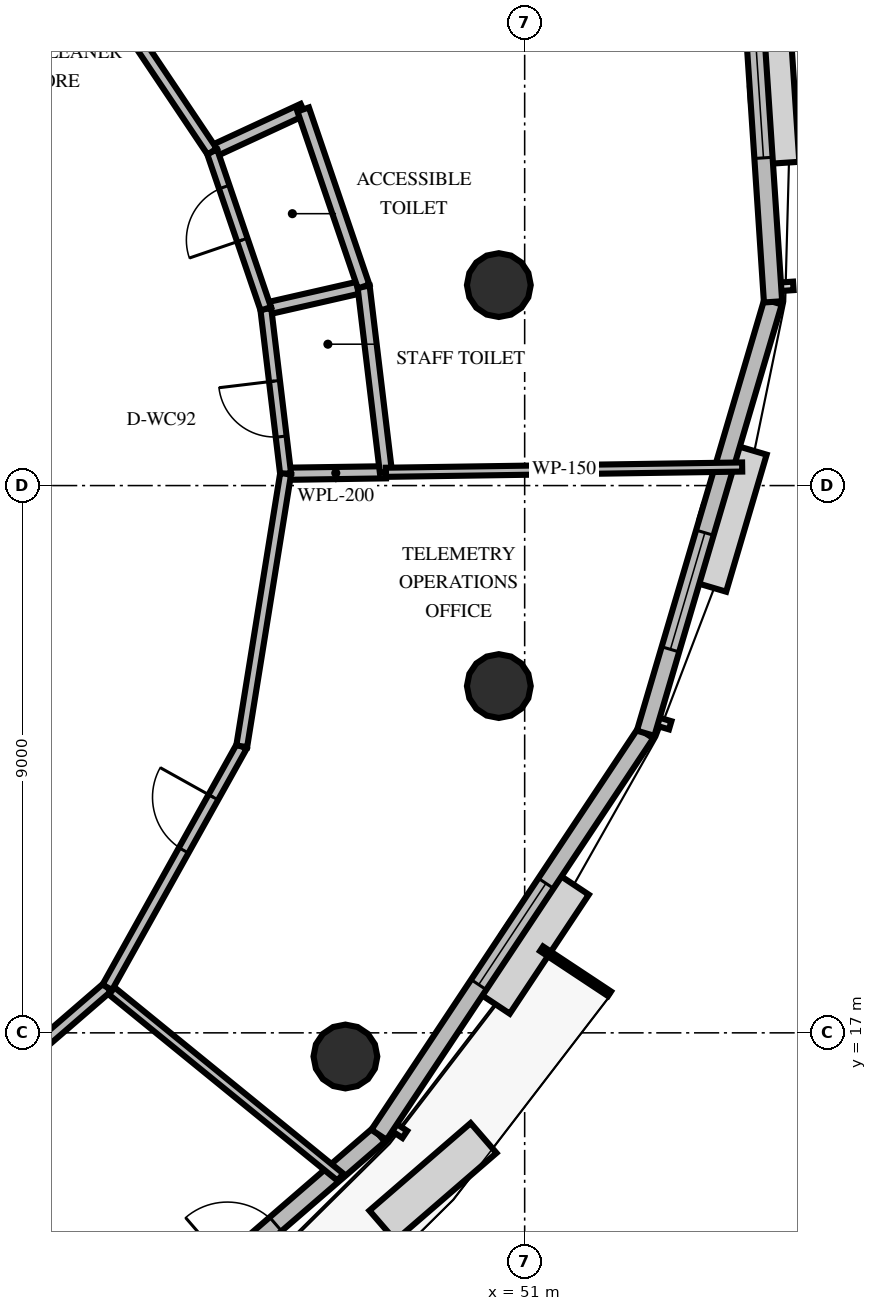
"""IFC4 building model, lengths in metres.
Left out: names, types, materials, properties, quantities, classifications, styles, units other than length and angle.
Written with IfcOpenShell. Run it as: python <this file> out.ifc"""

import sys

from ifc_helpers import new_model, si_unit, direction, frame, frame_2d, origin, origin_2d, place, context, subcontext, project, spatial, rectangle, circle, extrude, element, fill, save


model = new_model("IFC4")
c1 = context("Model", 3, precision=1e-05, world=origin(), true_north=direction((0.0, 1.0)))
c2 = subcontext(c1, "Body", "Model", "MODEL_VIEW")
j1 = project(units=[si_unit("LENGTHUNIT", "METRE"), si_unit("PLANEANGLEUNIT", "RADIAN")], contexts=[c1])
p1 = place(None, origin())
s1 = spatial("IfcSite", under=j1, at=p1, CompositionType="ELEMENT")
p2 = place(p1, origin())
s2 = spatial("IfcBuilding", under=s1, at=p2, CompositionType="ELEMENT")
p3 = place(p2, frame((0.0, 0.0, 202.4)))
s3 = spatial("IfcBuildingStorey", under=s2, at=p3, CompositionType="ELEMENT", Elevation=202.4)
for number, where, z_axis, x_axis in (
    (1, (50.575, 29.297, 0.0), (0.0, 0.0, 1.0), (1.0, 0.0, 0.0)),
    (2, (48.052, 16.611, 0.0), (0.0, 0.0, 1.0), (1.0, 0.0, 0.0)),
    (3, (50.575, 22.703, 0.0), (0.0, 0.0, 1.0), (1.0, 0.0, 0.0)),
):
    element("IfcColumn", number, at=place(p3, frame(where, z_axis=z_axis, x_axis=x_axis)), inside=s3, PredefinedType="COLUMN", context=c2, shape_type="SweptSolid", body=[
        extrude(circle(Radius=0.525, at=origin_2d()), origin(), (0.0, 0.0, 1.0), 3.6),
    ])
p4 = place(p3, frame((42.457, 10.008, 0.0), z_axis=(0.0, 0.0, 1.0), x_axis=(0.756414189181, 0.65409294019, 0.0)))
e4 = element("IfcWall", 4, at=p4, inside=s3, PredefinedType="SOLIDWALL", context=c2, shape_type="SweptSolid", body=[
    extrude(rectangle(XDim=8.127, YDim=0.3, at=frame_2d((4.063, 0.0))), origin(), (0.0, 0.0, 1.0), 2.66),
])
p5 = place(p4, frame((4.83, 0.0, 0.0)))
e5 = element("IfcOpeningElement", 5, at=p5, cuts=e4, PredefinedType="OPENING", context=c2, shape_type="SweptSolid", body=[
    extrude(rectangle(XDim=1.05, YDim=2.15, at=frame_2d((0.525, 1.075))), frame((0.0, 0.16, 0.0), z_axis=(0.0, -1.0, 0.0), x_axis=(1.0, 0.0, 0.0)), (0.0, 0.0, 1.0), 0.32),
])
p6 = place(p3, frame((48.604, 15.323, 0.0), z_axis=(0.0, 0.0, 1.0), x_axis=(0.553263688025, 0.833006177356, 0.0)))
e6 = element("IfcWall", 6, at=p6, inside=s3, PredefinedType="SOLIDWALL", context=c2, shape_type="SweptSolid", body=[
    extrude(rectangle(XDim=7.927, YDim=0.3, at=frame_2d((3.963, 0.0))), origin(), (0.0, 0.0, 1.0), 2.66),
])
p7 = place(p6, frame((2.964, 0.0, 0.8)))
e7 = element("IfcOpeningElement", 7, at=p7, cuts=e6, PredefinedType="OPENING", context=c2, shape_type="SweptSolid", body=[
    extrude(rectangle(XDim=2.0, YDim=1.85, at=frame_2d((1.0, 0.925))), frame((0.0, 0.16, 0.0), z_axis=(0.0, -1.0, 0.0), x_axis=(1.0, 0.0, 0.0)), (0.0, 0.0, 1.0), 0.32),
])
p8 = place(p3, frame((52.99, 21.927, 0.0), z_axis=(0.0, 0.0, 1.0), x_axis=(0.283266806845, 0.959041144133, 0.0)))
e8 = element("IfcWall", 8, at=p8, inside=s3, PredefinedType="SOLIDWALL", context=c2, shape_type="SweptSolid", body=[
    extrude(rectangle(XDim=7.397, YDim=0.3, at=frame_2d((3.699, 0.0))), origin(), (0.0, 0.0, 1.0), 2.66),
])
p9 = place(p8, frame((1.439, 0.0, 0.8)))
e9 = element("IfcOpeningElement", 9, at=p9, cuts=e8, PredefinedType="OPENING", context=c2, shape_type="SweptSolid", body=[
    extrude(rectangle(XDim=2.0, YDim=1.85, at=frame_2d((1.0, 0.925))), frame((0.0, 0.16, 0.0), z_axis=(0.0, -1.0, 0.0), x_axis=(1.0, 0.0, 0.0)), (0.0, 0.0, 1.0), 0.32),
])
p10 = place(p3, frame((55.085, 29.021, 0.0), z_axis=(0.0, 0.0, 1.0), x_axis=(-0.066382076565, 0.997794277349, 0.0)))
e10 = element("IfcWall", 10, at=p10, inside=s3, PredefinedType="SOLIDWALL", context=c2, shape_type="SweptSolid", body=[
    extrude(rectangle(XDim=6.745, YDim=0.3, at=frame_2d((3.373, 0.0))), origin(), (0.0, 0.0, 1.0), 2.66),
])
p11 = place(p10, frame((2.373, 0.0, 0.8)))
e11 = element("IfcOpeningElement", 11, at=p11, cuts=e10, PredefinedType="OPENING", context=c2, shape_type="SweptSolid", body=[
    extrude(rectangle(XDim=2.0, YDim=1.85, at=frame_2d((1.0, 0.925))), frame((0.0, 0.16, 0.0), z_axis=(0.0, -1.0, 0.0), x_axis=(1.0, 0.0, 0.0)), (0.0, 0.0, 1.0), 0.32),
])
p12 = place(p3, frame((47.069, 26.194, 0.0), z_axis=(0.0, 0.0, 1.0), x_axis=(0.999888338455, 0.014943581264, 0.0)))
e12 = element("IfcWall", 12, at=p12, inside=s3, PredefinedType="PLUMBINGWALL", context=c2, shape_type="SweptSolid", body=[
    extrude(rectangle(XDim=1.65, YDim=0.2, at=frame_2d((0.825, 0.0))), origin(), (0.0, 0.0, 1.0), 2.46),
])
p13 = place(p3, frame((46.743, 28.907, 0.0), z_axis=(0.0, 0.0, 1.0), x_axis=(0.974956674022, 0.22239488254, 0.0)))
e13 = element("IfcWall", 13, at=p13, inside=s3, PredefinedType="PLUMBINGWALL", context=c2, shape_type="SweptSolid", body=[
    extrude(rectangle(XDim=1.65, YDim=0.2, at=frame_2d((0.825, 0.0))), origin(), (0.0, 0.0, 1.0), 2.46),
])
p14 = place(p3, frame((48.719, 26.219, 0.0), z_axis=(0.0, 0.0, 1.0), x_axis=(-0.119326673421, 0.992855047331, 0.0)))
e14 = element("IfcWall", 14, at=p14, inside=s3, PredefinedType="PLUMBINGWALL", context=c2, shape_type="SweptSolid", body=[
    extrude(rectangle(XDim=3.077, YDim=0.2, at=frame_2d((1.539, 0.0))), origin(), (0.0, 0.0, 1.0), 2.46),
])
p15 = place(p3, frame((47.069, 26.194, 0.0), z_axis=(0.0, 0.0, 1.0), x_axis=(-0.119282627246, 0.992860340046, 0.0)))
e15 = element("IfcWall", 15, at=p15, inside=s3, PredefinedType="PARTITIONING", context=c2, shape_type="SweptSolid", body=[
    extrude(rectangle(XDim=2.732, YDim=0.18, at=frame_2d((1.366, 0.0))), origin(), (0.0, 0.0, 1.0), 2.46),
])
p16 = place(p15, frame((0.616, 0.0, 0.0)))
e16 = element("IfcOpeningElement", 16, at=p16, cuts=e15, PredefinedType="OPENING", context=c2, shape_type="SweptSolid", body=[
    extrude(rectangle(XDim=0.92, YDim=2.1, at=frame_2d((0.46, 1.05))), frame((0.0, 0.1, 0.0), z_axis=(0.0, -1.0, 0.0), x_axis=(1.0, 0.0, 0.0)), (0.0, 0.0, 1.0), 0.2),
])
p17 = place(p3, frame((45.86, 31.493, 0.0), z_axis=(0.0, 0.0, 1.0), x_axis=(0.907430342314, 0.420202539079, 0.0)))
e17 = element("IfcWall", 17, at=p17, inside=s3, PredefinedType="PLUMBINGWALL", context=c2, shape_type="SweptSolid", body=[
    extrude(rectangle(XDim=1.65, YDim=0.2, at=frame_2d((0.825, 0.0))), origin(), (0.0, 0.0, 1.0), 2.46),
])
p18 = place(p3, frame((48.351, 29.274, 0.0), z_axis=(0.0, 0.0, 1.0), x_axis=(-0.323050273296, 0.946381805047, 0.0)))
e18 = element("IfcWall", 18, at=p18, inside=s3, PredefinedType="PLUMBINGWALL", context=c2, shape_type="SweptSolid", body=[
    extrude(rectangle(XDim=3.077, YDim=0.2, at=frame_2d((1.539, 0.0))), origin(), (0.0, 0.0, 1.0), 2.46),
])
p19 = place(p3, frame((46.743, 28.907, 0.0), z_axis=(0.0, 0.0, 1.0), x_axis=(-0.323081399618, 0.946371179412, 0.0)))
e19 = element("IfcWall", 19, at=p19, inside=s3, PredefinedType="PARTITIONING", context=c2, shape_type="SweptSolid", body=[
    extrude(rectangle(XDim=2.732, YDim=0.18, at=frame_2d((1.366, 0.0))), origin(), (0.0, 0.0, 1.0), 2.46),
])
p20 = place(p19, frame((1.197, 0.0, 0.0)))
e20 = element("IfcOpeningElement", 20, at=p20, cuts=e19, PredefinedType="OPENING", context=c2, shape_type="SweptSolid", body=[
    extrude(rectangle(XDim=0.92, YDim=2.1, at=frame_2d((0.46, 1.05))), frame((0.0, 0.1, 0.0), z_axis=(0.0, -1.0, 0.0), x_axis=(1.0, 0.0, 0.0)), (0.0, 0.0, 1.0), 0.2),
])
p21 = place(p3, frame((48.719, 26.219, 0.0), z_axis=(0.0, 0.0, 1.0), x_axis=(0.999889967594, 0.014834173548, 0.0)))
e21 = element("IfcWall", 21, at=p21, inside=s3, PredefinedType="PARTITIONING", context=c2, shape_type="SweptSolid", body=[
    extrude(rectangle(XDim=5.859, YDim=0.15, at=frame_2d((2.93, 0.0))), origin(), (0.0, 0.0, 1.0), 2.46),
])
p22 = place(p3, frame((45.86, 31.493, 0.0), z_axis=(0.0, 0.0, 1.0), x_axis=(-0.557040240319, 0.830485502983, 0.0)))
e22 = element("IfcWall", 22, at=p22, inside=s3, PredefinedType="PARTITIONING", context=c2, shape_type="SweptSolid", body=[
    extrude(rectangle(XDim=4.089, YDim=0.18, at=frame_2d((2.044, 0.0))), origin(), (0.0, 0.0, 1.0), 2.46),
])
p23 = place(p3, frame((44.136, 17.748, 0.0), z_axis=(0.0, 0.0, 1.0), x_axis=(0.775486642506, -0.631363973706, 0.0)))
e23 = element("IfcWall", 23, at=p23, inside=s3, PredefinedType="PARTITIONING", context=c2, shape_type="SweptSolid", body=[
    extrude(rectangle(XDim=4.943, YDim=0.15, at=frame_2d((2.472, 0.0))), origin(), (0.0, 0.0, 1.0), 2.46),
])
p24 = place(p3, frame((40.702, 14.779, 0.0), z_axis=(0.0, 0.0, 1.0), x_axis=(0.756428618382, 0.654076253423, 0.0)))
e24 = element("IfcWall", 24, at=p24, inside=s3, PredefinedType="PARTITIONING", context=c2, shape_type="SweptSolid", body=[
    extrude(rectangle(XDim=4.539, YDim=0.18, at=frame_2d((2.27, 0.0))), origin(), (0.0, 0.0, 1.0), 2.46),
])
p25 = place(p3, frame((44.136, 17.748, 0.0), z_axis=(0.0, 0.0, 1.0), x_axis=(0.487099084589, 0.873346713392, 0.0)))
e25 = element("IfcWall", 25, at=p25, inside=s3, PredefinedType="PARTITIONING", context=c2, shape_type="SweptSolid", body=[
    extrude(rectangle(XDim=4.539, YDim=0.18, at=frame_2d((2.27, 0.0))), origin(), (0.0, 0.0, 1.0), 2.46),
])
p26 = place(p25, frame((2.579, 0.0, 0.0)))
e26 = element("IfcOpeningElement", 26, at=p26, cuts=e25, PredefinedType="OPENING", context=c2, shape_type="SweptSolid", body=[
    extrude(rectangle(XDim=1.0, YDim=2.15, at=frame_2d((0.5, 1.075))), frame((0.0, 0.1, 0.0), z_axis=(0.0, -1.0, 0.0), x_axis=(1.0, 0.0, 0.0)), (0.0, 0.0, 1.0), 0.2),
])
p27 = place(p3, frame((46.347, 21.712, 0.0), z_axis=(0.0, 0.0, 1.0), x_axis=(0.159041352882, 0.987271922053, 0.0)))
e27 = element("IfcWall", 27, at=p27, inside=s3, PredefinedType="PARTITIONING", context=c2, shape_type="SweptSolid", body=[
    extrude(rectangle(XDim=4.539, YDim=0.18, at=frame_2d((2.27, 0.0))), origin(), (0.0, 0.0, 1.0), 2.46),
])
p28 = place(p5, origin())
e28 = element("IfcDoor", 28, at=p28, inside=s3, OperationType="SINGLE_SWING_LEFT", PredefinedType="DOOR", context=c2, shape_type="SweptSolid", body=[
    extrude(rectangle(XDim=1.05, YDim=2.15, at=frame_2d((0.525, 1.075))), frame((0.0, 0.025, 0.0), z_axis=(0.0, -1.0, 0.0), x_axis=(1.0, 0.0, 0.0)), (0.0, 0.0, 1.0), 0.05),
])
fill(e5, e28)
p29 = place(p7, origin())
e29 = element("IfcWindow", 29, at=p29, inside=s3, PartitioningType="SINGLE_PANEL", PredefinedType="WINDOW", context=c2, shape_type="SweptSolid", body=[
    extrude(rectangle(XDim=2.0, YDim=1.85, at=frame_2d((1.0, 0.925))), frame((0.0, 0.03, 0.0), z_axis=(0.0, -1.0, 0.0), x_axis=(1.0, 0.0, 0.0)), (0.0, 0.0, 1.0), 0.06),
])
fill(e7, e29)
p30 = place(p9, origin())
e30 = element("IfcWindow", 30, at=p30, inside=s3, PartitioningType="SINGLE_PANEL", PredefinedType="WINDOW", context=c2, shape_type="SweptSolid", body=[
    extrude(rectangle(XDim=2.0, YDim=1.85, at=frame_2d((1.0, 0.925))), frame((0.0, 0.03, 0.0), z_axis=(0.0, -1.0, 0.0), x_axis=(1.0, 0.0, 0.0)), (0.0, 0.0, 1.0), 0.06),
])
fill(e9, e30)
p31 = place(p11, origin())
e31 = element("IfcWindow", 31, at=p31, inside=s3, PartitioningType="SINGLE_PANEL", PredefinedType="WINDOW", context=c2, shape_type="SweptSolid", body=[
    extrude(rectangle(XDim=2.0, YDim=1.85, at=frame_2d((1.0, 0.925))), frame((0.0, 0.03, 0.0), z_axis=(0.0, -1.0, 0.0), x_axis=(1.0, 0.0, 0.0)), (0.0, 0.0, 1.0), 0.06),
])
fill(e11, e31)
p32 = place(p16, origin())
e32 = element("IfcDoor", 32, at=p32, inside=s3, OperationType="SINGLE_SWING_RIGHT", PredefinedType="DOOR", context=c2, shape_type="SweptSolid", body=[
    extrude(rectangle(XDim=0.92, YDim=2.1, at=frame_2d((0.46, 1.05))), frame((0.0, 0.025, 0.0), z_axis=(0.0, -1.0, 0.0), x_axis=(1.0, 0.0, 0.0)), (0.0, 0.0, 1.0), 0.05),
])
fill(e16, e32)
p33 = place(p20, origin())
e33 = element("IfcDoor", 33, at=p33, inside=s3, OperationType="SINGLE_SWING_LEFT", PredefinedType="DOOR", context=c2, shape_type="SweptSolid", body=[
    extrude(rectangle(XDim=0.92, YDim=2.1, at=frame_2d((0.46, 1.05))), frame((0.0, 0.025, 0.0), z_axis=(0.0, -1.0, 0.0), x_axis=(1.0, 0.0, 0.0)), (0.0, 0.0, 1.0), 0.05),
])
fill(e20, e33)
p34 = place(p26, origin())
e34 = element("IfcDoor", 34, at=p34, inside=s3, OperationType="SINGLE_SWING_RIGHT", PredefinedType="DOOR", context=c2, shape_type="SweptSolid", body=[
    extrude(rectangle(XDim=1.0, YDim=2.15, at=frame_2d((0.5, 1.075))), frame((0.0, 0.025, 0.0), z_axis=(0.0, -1.0, 0.0), x_axis=(1.0, 0.0, 0.0)), (0.0, 0.0, 1.0), 0.05),
])
fill(e26, e34)
save(model, sys.argv[1])
